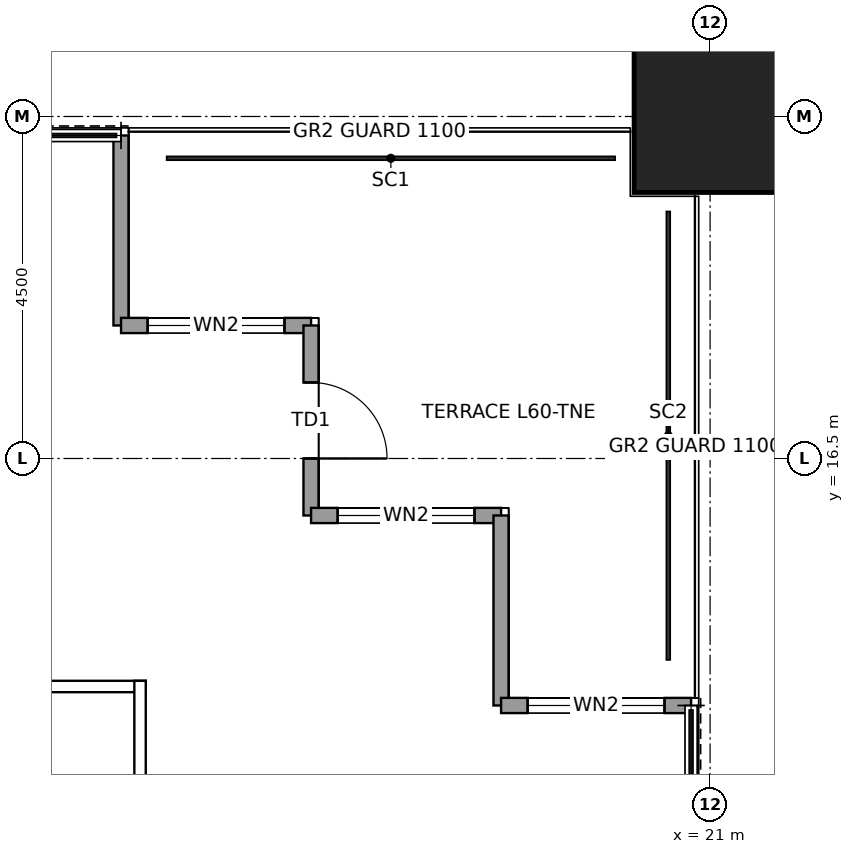
"""IFC4 building model, lengths in metres.
Left out: names, types, materials, properties, quantities, classifications, styles, units other than length and angle.
Written with IfcOpenShell. Run it as: python <this file> out.ifc"""

import sys

from ifc_helpers import new_model, si_unit, direction, frame, frame_2d, origin, origin_2d, place, context, subcontext, project, spatial, rectangle, hollow_rectangle, extrude, element, fill, save


model = new_model("IFC4")
c1 = context("Model", 3, precision=1e-05, world=origin(), true_north=direction((0.0, 1.0)))
c2 = subcontext(c1, "Body", "Model", "MODEL_VIEW")
j1 = project(units=[si_unit("LENGTHUNIT", "METRE"), si_unit("PLANEANGLEUNIT", "RADIAN")], contexts=[c1])
p1 = place(None, origin())
s1 = spatial("IfcSite", under=j1, at=p1, CompositionType="ELEMENT")
p2 = place(p1, origin())
s2 = spatial("IfcBuilding", under=s1, at=p2, CompositionType="ELEMENT")
p3 = place(p2, frame((0.0, 0.0, 275.9)))
s3 = spatial("IfcBuildingStorey", under=s2, at=p3, CompositionType="ELEMENT", Elevation=275.9)
p4 = place(p3, frame((21.0, 21.0, 0.0), z_axis=(0.0, 0.0, 1.0), x_axis=(1.0, 0.0, 0.0)))
e1 = element("IfcColumn", 1, at=p4, inside=s3, PredefinedType="COLUMN", context=c2, shape_type="SweptSolid", body=[
    extrude(hollow_rectangle(XDim=2.0, YDim=2.0, WallThickness=0.095, at=origin_2d()), origin(), (0.0, 0.0, 1.0), 4.0),
])
p5 = place(p3, frame((13.25, 20.75, 0.0), z_axis=(0.0, 0.0, 1.0), x_axis=(0.0, -1.0, 0.0)))
e2 = element("IfcWall", 2, at=p5, inside=s3, PredefinedType="SOLIDWALL", context=c2, shape_type="SweptSolid", body=[
    extrude(rectangle(XDim=2.5, YDim=0.2, at=frame_2d((1.25, 0.0))), origin(), (0.0, 0.0, 1.0), 3.85),
])
p6 = place(p3, frame((13.25, 18.25, 0.0), z_axis=(0.0, 0.0, 1.0), x_axis=(1.0, 0.0, 0.0)))
e3 = element("IfcWall", 3, at=p6, inside=s3, PredefinedType="SOLIDWALL", context=c2, shape_type="SweptSolid", body=[
    extrude(rectangle(XDim=2.5, YDim=0.2, at=frame_2d((1.25, 0.0))), origin(), (0.0, 0.0, 1.0), 3.85),
])
p7 = place(p6, frame((0.35, 0.0, 0.3)))
e4 = element("IfcOpeningElement", 4, at=p7, cuts=e3, PredefinedType="OPENING", context=c2, shape_type="SweptSolid", body=[
    extrude(rectangle(XDim=1.8, YDim=2.4, at=frame_2d((0.9, 1.2))), frame((0.0, 0.11, 0.0), z_axis=(0.0, -1.0, 0.0), x_axis=(1.0, 0.0, 0.0)), (0.0, 0.0, 1.0), 0.22),
])
p8 = place(p3, frame((15.75, 18.25, 0.0), z_axis=(0.0, 0.0, 1.0), x_axis=(0.0, -1.0, 0.0)))
e5 = element("IfcWall", 5, at=p8, inside=s3, PredefinedType="SOLIDWALL", context=c2, shape_type="SweptSolid", body=[
    extrude(rectangle(XDim=2.5, YDim=0.2, at=frame_2d((1.25, 0.0))), origin(), (0.0, 0.0, 1.0), 3.317),
])
p9 = place(p8, frame((0.75, 0.0, 0.0)))
e6 = element("IfcOpeningElement", 6, at=p9, cuts=e5, PredefinedType="OPENING", context=c2, shape_type="SweptSolid", body=[
    extrude(rectangle(XDim=1.0, YDim=2.4, at=frame_2d((0.5, 1.2))), frame((0.0, 0.11, 0.0), z_axis=(0.0, -1.0, 0.0), x_axis=(1.0, 0.0, 0.0)), (0.0, 0.0, 1.0), 0.22),
])
p10 = place(p3, frame((15.75, 15.75, 0.0), z_axis=(0.0, 0.0, 1.0), x_axis=(1.0, 0.0, 0.0)))
e7 = element("IfcWall", 7, at=p10, inside=s3, PredefinedType="SOLIDWALL", context=c2, shape_type="SweptSolid", body=[
    extrude(rectangle(XDim=2.5, YDim=0.2, at=frame_2d((1.25, 0.0))), origin(), (0.0, 0.0, 1.0), 3.85),
])
p11 = place(p10, frame((0.35, 0.0, 0.3)))
e8 = element("IfcOpeningElement", 8, at=p11, cuts=e7, PredefinedType="OPENING", context=c2, shape_type="SweptSolid", body=[
    extrude(rectangle(XDim=1.8, YDim=2.4, at=frame_2d((0.9, 1.2))), frame((0.0, 0.11, 0.0), z_axis=(0.0, -1.0, 0.0), x_axis=(1.0, 0.0, 0.0)), (0.0, 0.0, 1.0), 0.22),
])
p12 = place(p3, frame((18.25, 15.75, 0.0), z_axis=(0.0, 0.0, 1.0), x_axis=(0.0, -1.0, 0.0)))
e9 = element("IfcWall", 9, at=p12, inside=s3, PredefinedType="SOLIDWALL", context=c2, shape_type="SweptSolid", body=[
    extrude(rectangle(XDim=2.5, YDim=0.2, at=frame_2d((1.25, 0.0))), origin(), (0.0, 0.0, 1.0), 3.85),
])
p13 = place(p3, frame((18.25, 13.25, 0.0), z_axis=(0.0, 0.0, 1.0), x_axis=(1.0, 0.0, 0.0)))
e10 = element("IfcWall", 10, at=p13, inside=s3, PredefinedType="SOLIDWALL", context=c2, shape_type="SweptSolid", body=[
    extrude(rectangle(XDim=2.5, YDim=0.2, at=frame_2d((1.25, 0.0))), origin(), (0.0, 0.0, 1.0), 3.85),
])
p14 = place(p13, frame((0.35, 0.0, 0.3)))
e11 = element("IfcOpeningElement", 11, at=p14, cuts=e10, PredefinedType="OPENING", context=c2, shape_type="SweptSolid", body=[
    extrude(rectangle(XDim=1.8, YDim=2.4, at=frame_2d((0.9, 1.2))), frame((0.0, 0.11, 0.0), z_axis=(0.0, -1.0, 0.0), x_axis=(1.0, 0.0, 0.0)), (0.0, 0.0, 1.0), 0.22),
])
p15 = place(p3, frame((7.425, 13.5, 0.0), z_axis=(0.0, 0.0, 1.0), x_axis=(1.0, 0.0, 0.0)))
e12 = element("IfcWall", 12, at=p15, inside=s3, PredefinedType="PARTITIONING", context=c2, shape_type="SweptSolid", body=[
    extrude(rectangle(XDim=6.15, YDim=0.15, at=frame_2d((3.075, 0.0))), origin(), (0.0, 0.0, 1.0), 3.85),
])
p16 = place(p3, frame((13.5, -13.575, 0.0), z_axis=(0.0, 0.0, 1.0), x_axis=(0.0, 1.0, 0.0)))
e13 = element("IfcWall", 13, at=p16, inside=s3, PredefinedType="PARTITIONING", context=c2, shape_type="SweptSolid", body=[
    extrude(rectangle(XDim=27.15, YDim=0.15, at=frame_2d((13.575, 0.0))), origin(), (0.0, 0.0, 1.0), 3.85),
])
p17 = place(p7, origin())
e14 = element("IfcWindow", 14, at=p17, inside=s3, PartitioningType="SINGLE_PANEL", PredefinedType="WINDOW", context=c2, shape_type="SweptSolid", body=[
    extrude(rectangle(XDim=1.8, YDim=2.4, at=frame_2d((0.9, 1.2))), frame((0.0, 0.03, 0.0), z_axis=(0.0, -1.0, 0.0), x_axis=(1.0, 0.0, 0.0)), (0.0, 0.0, 1.0), 0.06),
])
fill(e4, e14)
p18 = place(p9, origin())
e15 = element("IfcDoor", 15, at=p18, inside=s3, OperationType="SINGLE_SWING_RIGHT", PredefinedType="DOOR", context=c2, shape_type="SweptSolid", body=[
    extrude(rectangle(XDim=1.0, YDim=2.4, at=frame_2d((0.5, 1.2))), frame((0.0, 0.025, 0.0), z_axis=(0.0, -1.0, 0.0), x_axis=(1.0, 0.0, 0.0)), (0.0, 0.0, 1.0), 0.05),
])
fill(e6, e15)
p19 = place(p11, origin())
e16 = element("IfcWindow", 16, at=p19, inside=s3, PartitioningType="SINGLE_PANEL", PredefinedType="WINDOW", context=c2, shape_type="SweptSolid", body=[
    extrude(rectangle(XDim=1.8, YDim=2.4, at=frame_2d((0.9, 1.2))), frame((0.0, 0.03, 0.0), z_axis=(0.0, -1.0, 0.0), x_axis=(1.0, 0.0, 0.0)), (0.0, 0.0, 1.0), 0.06),
])
fill(e8, e16)
p20 = place(p14, origin())
e17 = element("IfcWindow", 17, at=p20, inside=s3, PartitioningType="SINGLE_PANEL", PredefinedType="WINDOW", context=c2, shape_type="SweptSolid", body=[
    extrude(rectangle(XDim=1.8, YDim=2.4, at=frame_2d((0.9, 1.2))), frame((0.0, 0.03, 0.0), z_axis=(0.0, -1.0, 0.0), x_axis=(1.0, 0.0, 0.0)), (0.0, 0.0, 1.0), 0.06),
])
fill(e11, e17)
save(model, sys.argv[1])
